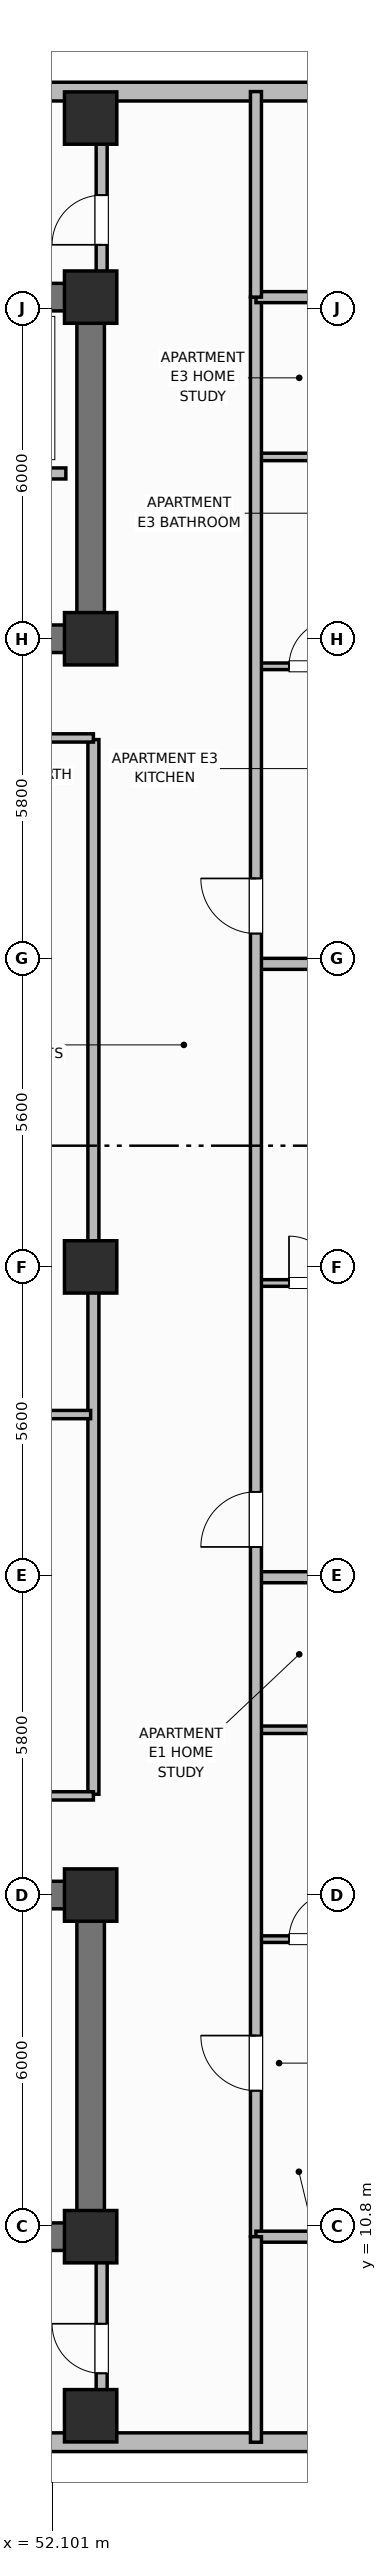
"""IFC4 building model, lengths in metres.
Left out: names, types, materials, properties, quantities, classifications, styles, units other than length and angle.
Written with IfcOpenShell. Run it as: python <this file> out.ifc"""

import sys

from ifc_helpers import new_model, si_unit, direction, frame, frame_2d, origin, origin_2d, place, context, subcontext, project, spatial, rectangle, extrude, element, fill, save


model = new_model("IFC4")
c1 = context("Model", 3, precision=1e-05, world=origin(), true_north=direction((0.0, 1.0)))
c2 = subcontext(c1, "Body", "Model", "MODEL_VIEW")
j1 = project(units=[si_unit("LENGTHUNIT", "METRE"), si_unit("PLANEANGLEUNIT", "RADIAN")], contexts=[c1])
p1 = place(None, origin())
s1 = spatial("IfcSite", under=j1, at=p1, CompositionType="ELEMENT")
p2 = place(p1, origin())
s2 = spatial("IfcBuilding", under=s1, at=p2, CompositionType="ELEMENT")
p3 = place(p2, frame((0.0, 0.0, 151.5)))
s3 = spatial("IfcBuildingStorey", under=s2, at=p3, CompositionType="ELEMENT", Elevation=151.5)
p4 = place(p3, frame((52.8, 10.6, 0.0), z_axis=(0.0, 0.0, 1.0), x_axis=(-1.0, 0.0, 0.0)))
e1 = element("IfcWall", 1, at=p4, inside=s3, PredefinedType="SHEAR", context=c2, shape_type="SweptSolid", body=[
    extrude(rectangle(XDim=27.2, YDim=0.5, at=frame_2d((13.6, 0.0))), origin(), (0.0, 0.0, 1.0), 3.7),
])
p5 = place(p3, frame((52.8, 10.85, 0.0), z_axis=(0.0, 0.0, 1.0), x_axis=(0.0, 1.0, 0.0)))
e2 = element("IfcWall", 2, at=p5, inside=s3, PredefinedType="SHEAR", context=c2, shape_type="SweptSolid", body=[
    extrude(rectangle(XDim=5.7, YDim=0.5, at=frame_2d((2.85, 0.0))), origin(), (0.0, 0.0, 1.0), 3.7),
])
p6 = place(p3, frame((25.6, 16.8, 0.0), z_axis=(0.0, 0.0, 1.0), x_axis=(1.0, 0.0, 0.0)))
e3 = element("IfcWall", 3, at=p6, inside=s3, PredefinedType="SHEAR", context=c2, shape_type="SweptSolid", body=[
    extrude(rectangle(XDim=27.2, YDim=0.5, at=frame_2d((13.6, 0.0))), origin(), (0.0, 0.0, 1.0), 3.7),
])
p7 = place(p6, frame((1.9, 0.0, 0.0)))
e4 = element("IfcOpeningElement", 4, at=p7, cuts=e3, PredefinedType="OPENING", context=c2, shape_type="SweptSolid", body=[
    extrude(rectangle(XDim=1.1, YDim=2.15, at=frame_2d((0.55, 1.075))), frame((0.0, 0.26, 0.0), z_axis=(0.0, -1.0, 0.0), x_axis=(1.0, 0.0, 0.0)), (0.0, 0.0, 1.0), 0.52),
])
p8 = place(p6, frame((13.0, 0.0, 0.0)))
e5 = element("IfcOpeningElement", 5, at=p8, cuts=e3, PredefinedType="OPENING", context=c2, shape_type="SweptSolid", body=[
    extrude(rectangle(XDim=1.2, YDim=2.15, at=frame_2d((0.6, 1.075))), frame((0.0, 0.26, 0.0), z_axis=(0.0, -1.0, 0.0), x_axis=(1.0, 0.0, 0.0)), (0.0, 0.0, 1.0), 0.52),
])
p9 = place(p6, frame((21.6, 0.0, 0.0)))
e6 = element("IfcOpeningElement", 6, at=p9, cuts=e3, PredefinedType="OPENING", context=c2, shape_type="SweptSolid", body=[
    extrude(rectangle(XDim=1.0, YDim=2.15, at=frame_2d((0.5, 1.075))), frame((0.0, 0.26, 0.0), z_axis=(0.0, -1.0, 0.0), x_axis=(1.0, 0.0, 0.0)), (0.0, 0.0, 1.0), 0.52),
])
p10 = place(p3, frame((25.6, 45.8, 0.0), z_axis=(0.0, 0.0, 1.0), x_axis=(1.0, 0.0, 0.0)))
e7 = element("IfcWall", 7, at=p10, inside=s3, PredefinedType="SHEAR", context=c2, shape_type="SweptSolid", body=[
    extrude(rectangle(XDim=27.2, YDim=0.5, at=frame_2d((13.6, 0.0))), origin(), (0.0, 0.0, 1.0), 3.7),
])
p11 = place(p3, frame((52.8, 39.85, 0.0), z_axis=(0.0, 0.0, 1.0), x_axis=(0.0, 1.0, 0.0)))
e8 = element("IfcWall", 8, at=p11, inside=s3, PredefinedType="SHEAR", context=c2, shape_type="SweptSolid", body=[
    extrude(rectangle(XDim=5.7, YDim=0.5, at=frame_2d((2.85, 0.0))), origin(), (0.0, 0.0, 1.0), 3.7),
])
p12 = place(p3, frame((52.8, 39.6, 0.0), z_axis=(0.0, 0.0, 1.0), x_axis=(-1.0, 0.0, 0.0)))
e9 = element("IfcWall", 9, at=p12, inside=s3, PredefinedType="SHEAR", context=c2, shape_type="SweptSolid", body=[
    extrude(rectangle(XDim=27.2, YDim=0.5, at=frame_2d((13.6, 0.0))), origin(), (0.0, 0.0, 1.0), 3.7),
])
p13 = place(p12, frame((24.2, 0.0, 0.0)))
e10 = element("IfcOpeningElement", 10, at=p13, cuts=e9, PredefinedType="OPENING", context=c2, shape_type="SweptSolid", body=[
    extrude(rectangle(XDim=1.1, YDim=2.15, at=frame_2d((0.55, 1.075))), frame((0.0, 0.26, 0.0), z_axis=(0.0, -1.0, 0.0), x_axis=(1.0, 0.0, 0.0)), (0.0, 0.0, 1.0), 0.52),
])
p14 = place(p12, frame((15.1, 0.0, 0.0)))
e11 = element("IfcOpeningElement", 11, at=p14, cuts=e9, PredefinedType="OPENING", context=c2, shape_type="SweptSolid", body=[
    extrude(rectangle(XDim=1.2, YDim=2.15, at=frame_2d((0.6, 1.075))), frame((0.0, 0.26, 0.0), z_axis=(0.0, -1.0, 0.0), x_axis=(1.0, 0.0, 0.0)), (0.0, 0.0, 1.0), 0.52),
])
p15 = place(p12, frame((11.6, 0.0, 0.0)))
e12 = element("IfcOpeningElement", 12, at=p15, cuts=e9, PredefinedType="OPENING", context=c2, shape_type="SweptSolid", body=[
    extrude(rectangle(XDim=0.9, YDim=2.1, at=frame_2d((0.45, 1.05))), frame((0.0, 0.26, 0.0), z_axis=(0.0, -1.0, 0.0), x_axis=(1.0, 0.0, 0.0)), (0.0, 0.0, 1.0), 0.52),
])
p16 = place(p12, frame((7.35, 0.0, 0.0)))
e13 = element("IfcOpeningElement", 13, at=p16, cuts=e9, PredefinedType="OPENING", context=c2, shape_type="SweptSolid", body=[
    extrude(rectangle(XDim=0.85, YDim=2.1, at=frame_2d((0.425, 1.05))), frame((0.0, 0.26, 0.0), z_axis=(0.0, -1.0, 0.0), x_axis=(1.0, 0.0, 0.0)), (0.0, 0.0, 1.0), 0.52),
])
p17 = place(p12, frame((3.6, 0.0, 0.0)))
e14 = element("IfcOpeningElement", 14, at=p17, cuts=e9, PredefinedType="OPENING", context=c2, shape_type="SweptSolid", body=[
    extrude(rectangle(XDim=1.0, YDim=2.15, at=frame_2d((0.5, 1.075))), frame((0.0, 0.26, 0.0), z_axis=(0.0, -1.0, 0.0), x_axis=(1.0, 0.0, 0.0)), (0.0, 0.0, 1.0), 0.52),
])
for number, where, z_axis, x_axis in (
    (15, (52.8, 10.6, 0.0), (0.0, 0.0, 1.0), (1.0, 0.0, 0.0)),
    (16, (52.8, 16.8, 0.0), (0.0, 0.0, 1.0), (1.0, 0.0, 0.0)),
    (17, (52.8, 39.6, 0.0), (0.0, 0.0, 1.0), (1.0, 0.0, 0.0)),
    (18, (52.8, 45.8, 0.0), (0.0, 0.0, 1.0), (1.0, 0.0, 0.0)),
    (19, (52.8, 28.2, 0.0), (0.0, 0.0, 1.0), (1.0, 0.0, 0.0)),
    (20, (52.8, 7.35, 0.0), (0.0, 0.0, 1.0), (1.0, 0.0, 0.0)),
    (21, (52.8, 49.05, 0.0), (0.0, 0.0, 1.0), (1.0, 0.0, 0.0)),
):
    element("IfcColumn", number, at=place(p3, frame(where, z_axis=z_axis, x_axis=x_axis)), inside=s3, PredefinedType="COLUMN", context=c2, shape_type="SweptSolid", body=[
        extrude(rectangle(XDim=0.95, YDim=0.95, at=origin_2d()), origin(), (0.0, 0.0, 1.0), 3.7),
    ])
p18 = place(p3, frame((42.4, 6.87, 0.0), z_axis=(0.0, 0.0, 1.0), x_axis=(1.0, 0.0, 0.0)))
e22 = element("IfcWall", 22, at=p18, inside=s3, PredefinedType="SOLIDWALL", context=c2, shape_type="SweptSolid", body=[
    extrude(rectangle(XDim=15.8, YDim=0.34, at=frame_2d((7.9, 0.0))), origin(), (0.0, 0.0, 1.0), 2.72),
])
p19 = place(p18, frame((5.387, 0.0, 0.75)))
e23 = element("IfcOpeningElement", 23, at=p19, cuts=e22, PredefinedType="OPENING", context=c2, shape_type="SweptSolid", body=[
    extrude(rectangle(XDim=1.4, YDim=1.85, at=frame_2d((0.7, 0.925))), frame((0.0, 0.18, 0.0), z_axis=(0.0, -1.0, 0.0), x_axis=(1.0, 0.0, 0.0)), (0.0, 0.0, 1.0), 0.36),
])
p20 = place(p3, frame((58.2, 49.53, 0.0), z_axis=(0.0, 0.0, 1.0), x_axis=(-1.0, 0.0, 0.0)))
e24 = element("IfcWall", 24, at=p20, inside=s3, PredefinedType="SOLIDWALL", context=c2, shape_type="SweptSolid", body=[
    extrude(rectangle(XDim=15.8, YDim=0.34, at=frame_2d((7.9, 0.0))), origin(), (0.0, 0.0, 1.0), 2.72),
])
p21 = place(p20, frame((8.812, 0.0, 0.75)))
e25 = element("IfcOpeningElement", 25, at=p21, cuts=e24, PredefinedType="OPENING", context=c2, shape_type="SweptSolid", body=[
    extrude(rectangle(XDim=1.8, YDim=1.85, at=frame_2d((0.9, 0.925))), frame((0.0, 0.18, 0.0), z_axis=(0.0, -1.0, 0.0), x_axis=(1.0, 0.0, 0.0)), (0.0, 0.0, 1.0), 0.36),
])
p22 = place(p3, frame((52.35, 42.6, 0.0), z_axis=(0.0, 0.0, 1.0), x_axis=(-1.0, 0.0, 0.0)))
e26 = element("IfcWall", 26, at=p22, inside=s3, PredefinedType="PARTITIONING", context=c2, shape_type="SweptSolid", body=[
    extrude(rectangle(XDim=6.5, YDim=0.2, at=frame_2d((3.25, 0.0))), origin(), (0.0, 0.0, 1.0), 2.55),
])
p23 = place(p3, frame((52.85, 18.63, 0.0), z_axis=(0.0, 0.0, 1.0), x_axis=(0.0, 1.0, 0.0)))
e27 = element("IfcWall", 27, at=p23, inside=s3, PredefinedType="PARTITIONING", context=c2, shape_type="SweptSolid", body=[
    extrude(rectangle(XDim=19.14, YDim=0.2, at=frame_2d((9.57, 0.0))), origin(), (0.0, 0.0, 1.0), 2.55),
])
for number, where, z_axis, x_axis in (
    (28, (30.55, 18.6, 0.0), (0.0, 0.0, 1.0), (1.0, 0.0, 0.0)),
    (29, (30.55, 37.8, 0.0), (0.0, 0.0, 1.0), (1.0, 0.0, 0.0)),
):
    element("IfcWall", number, at=place(p3, frame(where, z_axis=z_axis, x_axis=x_axis)), inside=s3, PredefinedType="PARTITIONING", context=c2, shape_type="SweptSolid", body=[
        extrude(rectangle(XDim=22.3, YDim=0.15, at=frame_2d((11.15, 0.0))), origin(), (0.0, 0.0, 1.0), 2.55),
    ])
p24 = place(p3, frame((30.58, 25.521, 0.0), z_axis=(0.0, 0.0, 1.0), x_axis=(1.0, 0.0, 0.0)))
e30 = element("IfcWall", 30, at=p24, inside=s3, PredefinedType="PARTITIONING", context=c2, shape_type="SweptSolid", body=[
    extrude(rectangle(XDim=22.22, YDim=0.15, at=frame_2d((11.11, 0.0))), origin(), (0.0, 0.0, 1.0), 2.55),
])
p25 = place(p3, frame((55.8, 16.0, 0.0), z_axis=(0.0, 0.0, 1.0), x_axis=(1.0, 0.0, 0.0)))
e31 = element("IfcWall", 31, at=p25, inside=s3, PredefinedType="PARTITIONING", context=c2, shape_type="SweptSolid", body=[
    extrude(rectangle(XDim=2.25, YDim=0.12, at=frame_2d((1.125, 0.0))), origin(), (0.0, 0.0, 1.0), 2.55),
])
p26 = place(p25, frame((0.6, 0.0, 0.0)))
e32 = element("IfcOpeningElement", 32, at=p26, cuts=e31, PredefinedType="OPENING", context=c2, shape_type="SweptSolid", body=[
    extrude(rectangle(XDim=0.85, YDim=2.1, at=frame_2d((0.425, 1.05))), frame((0.0, 0.07, 0.0), z_axis=(0.0, -1.0, 0.0), x_axis=(1.0, 0.0, 0.0)), (0.0, 0.0, 1.0), 0.14),
])
p27 = place(p3, frame((55.8, 19.8, 0.0), z_axis=(0.0, 0.0, 1.0), x_axis=(1.0, 0.0, 0.0)))
e33 = element("IfcWall", 33, at=p27, inside=s3, PredefinedType="PARTITIONING", context=c2, shape_type="SweptSolid", body=[
    extrude(rectangle(XDim=2.25, YDim=0.135, at=frame_2d((1.125, 0.0))), origin(), (0.0, 0.0, 1.0), 2.55),
])
p28 = place(p3, frame((55.8, 22.568, 0.0), z_axis=(0.0, 0.0, 1.0), x_axis=(1.0, 0.0, 0.0)))
e34 = element("IfcWall", 34, at=p28, inside=s3, PredefinedType="PARTITIONING", context=c2, shape_type="SweptSolid", body=[
    extrude(rectangle(XDim=6.03, YDim=0.2, at=frame_2d((3.015, 0.0))), origin(), (0.0, 0.0, 1.0), 2.55),
])
p29 = place(p3, frame((55.8, 27.908, 0.0), z_axis=(0.0, 0.0, 1.0), x_axis=(1.0, 0.0, 0.0)))
e35 = element("IfcWall", 35, at=p29, inside=s3, PredefinedType="PARTITIONING", context=c2, shape_type="SweptSolid", body=[
    extrude(rectangle(XDim=2.25, YDim=0.12, at=frame_2d((1.125, 0.0))), origin(), (0.0, 0.0, 1.0), 2.55),
])
p30 = place(p29, frame((0.6, 0.0, 0.0)))
e36 = element("IfcOpeningElement", 36, at=p30, cuts=e35, PredefinedType="OPENING", context=c2, shape_type="SweptSolid", body=[
    extrude(rectangle(XDim=0.85, YDim=2.1, at=frame_2d((0.425, 1.05))), frame((0.0, 0.07, 0.0), z_axis=(0.0, -1.0, 0.0), x_axis=(1.0, 0.0, 0.0)), (0.0, 0.0, 1.0), 0.14),
])
p31 = place(p3, frame((55.8, 33.7, 0.0), z_axis=(0.0, 0.0, 1.0), x_axis=(1.0, 0.0, 0.0)))
e37 = element("IfcWall", 37, at=p31, inside=s3, PredefinedType="PARTITIONING", context=c2, shape_type="SweptSolid", body=[
    extrude(rectangle(XDim=6.03, YDim=0.2, at=frame_2d((3.015, 0.0))), origin(), (0.0, 0.0, 1.0), 2.55),
])
p32 = place(p3, frame((55.8, 39.1, 0.0), z_axis=(0.0, 0.0, 1.0), x_axis=(1.0, 0.0, 0.0)))
e38 = element("IfcWall", 38, at=p32, inside=s3, PredefinedType="PARTITIONING", context=c2, shape_type="SweptSolid", body=[
    extrude(rectangle(XDim=2.25, YDim=0.12, at=frame_2d((1.125, 0.0))), origin(), (0.0, 0.0, 1.0), 2.55),
])
p33 = place(p32, frame((0.6, 0.0, 0.0)))
e39 = element("IfcOpeningElement", 39, at=p33, cuts=e38, PredefinedType="OPENING", context=c2, shape_type="SweptSolid", body=[
    extrude(rectangle(XDim=0.85, YDim=2.1, at=frame_2d((0.425, 1.05))), frame((0.0, 0.07, 0.0), z_axis=(0.0, -1.0, 0.0), x_axis=(1.0, 0.0, 0.0)), (0.0, 0.0, 1.0), 0.14),
])
p34 = place(p3, frame((55.8, 42.9, 0.0), z_axis=(0.0, 0.0, 1.0), x_axis=(1.0, 0.0, 0.0)))
e40 = element("IfcWall", 40, at=p34, inside=s3, PredefinedType="PARTITIONING", context=c2, shape_type="SweptSolid", body=[
    extrude(rectangle(XDim=2.25, YDim=0.135, at=frame_2d((1.125, 0.0))), origin(), (0.0, 0.0, 1.0), 2.55),
])
p35 = place(p3, frame((55.8, 10.6, 0.0), z_axis=(0.0, 0.0, 1.0), x_axis=(0.0, 1.0, 0.0)))
e41 = element("IfcWall", 41, at=p35, inside=s3, PredefinedType="PARTITIONING", context=c2, shape_type="SweptSolid", body=[
    extrude(rectangle(XDim=35.2, YDim=0.2, at=frame_2d((17.6, 0.0))), origin(), (0.0, 0.0, 1.0), 2.55),
])
p36 = place(p35, frame((2.65, 0.0, 0.0)))
e42 = element("IfcOpeningElement", 42, at=p36, cuts=e41, PredefinedType="OPENING", context=c2, shape_type="SweptSolid", body=[
    extrude(rectangle(XDim=1.0, YDim=2.15, at=frame_2d((0.5, 1.075))), frame((0.0, 0.11, 0.0), z_axis=(0.0, -1.0, 0.0), x_axis=(1.0, 0.0, 0.0)), (0.0, 0.0, 1.0), 0.22),
])
p37 = place(p35, frame((12.518, 0.0, 0.0)))
e43 = element("IfcOpeningElement", 43, at=p37, cuts=e41, PredefinedType="OPENING", context=c2, shape_type="SweptSolid", body=[
    extrude(rectangle(XDim=1.0, YDim=2.15, at=frame_2d((0.5, 1.075))), frame((0.0, 0.11, 0.0), z_axis=(0.0, -1.0, 0.0), x_axis=(1.0, 0.0, 0.0)), (0.0, 0.0, 1.0), 0.22),
])
p38 = place(p35, frame((23.65, 0.0, 0.0)))
e44 = element("IfcOpeningElement", 44, at=p38, cuts=e41, PredefinedType="OPENING", context=c2, shape_type="SweptSolid", body=[
    extrude(rectangle(XDim=1.0, YDim=2.15, at=frame_2d((0.5, 1.075))), frame((0.0, 0.11, 0.0), z_axis=(0.0, -1.0, 0.0), x_axis=(1.0, 0.0, 0.0)), (0.0, 0.0, 1.0), 0.22),
])
for number, where, z_axis, x_axis in (
    (45, (55.8, 10.6, 0.0), (0.0, 0.0, 1.0), (1.0, 0.0, 0.0)),
    (46, (55.8, 45.8, 0.0), (0.0, 0.0, 1.0), (1.0, 0.0, 0.0)),
):
    element("IfcWall", number, at=place(p3, frame(where, z_axis=z_axis, x_axis=x_axis)), inside=s3, PredefinedType="PARTITIONING", context=c2, shape_type="SweptSolid", body=[
        extrude(rectangle(XDim=5.61, YDim=0.2, at=frame_2d((2.805, 0.0))), origin(), (0.0, 0.0, 1.0), 2.55),
    ])
for number, where, z_axis, x_axis in (
    (47, (55.8, 6.87, 0.0), (0.0, 0.0, 1.0), (0.0, 1.0, 0.0)),
    (48, (55.8, 45.8, 0.0), (0.0, 0.0, 1.0), (0.0, 1.0, 0.0)),
):
    element("IfcWall", number, at=place(p3, frame(where, z_axis=z_axis, x_axis=x_axis)), inside=s3, PredefinedType="PARTITIONING", context=c2, shape_type="SweptSolid", body=[
        extrude(rectangle(XDim=3.73, YDim=0.2, at=frame_2d((1.865, 0.0))), origin(), (0.0, 0.0, 1.0), 2.55),
    ])
p39 = place(p3, frame((53.0, 7.47, 0.0), z_axis=(0.0, 0.0, 1.0), x_axis=(0.0, 1.0, 0.0)))
e49 = element("IfcWall", 49, at=p39, inside=s3, PredefinedType="PARTITIONING", context=c2, shape_type="SweptSolid", body=[
    extrude(rectangle(XDim=2.83, YDim=0.2, at=frame_2d((1.415, 0.0))), origin(), (0.0, 0.0, 1.0), 2.55),
])
p40 = place(p39, frame((0.65, 0.0, 0.0)))
e50 = element("IfcOpeningElement", 50, at=p40, cuts=e49, PredefinedType="OPENING", context=c2, shape_type="SweptSolid", body=[
    extrude(rectangle(XDim=0.9, YDim=2.1, at=frame_2d((0.45, 1.05))), frame((0.0, 0.11, 0.0), z_axis=(0.0, -1.0, 0.0), x_axis=(1.0, 0.0, 0.0)), (0.0, 0.0, 1.0), 0.22),
])
p41 = place(p3, frame((53.0, 46.1, 0.0), z_axis=(0.0, 0.0, 1.0), x_axis=(0.0, 1.0, 0.0)))
e51 = element("IfcWall", 51, at=p41, inside=s3, PredefinedType="PARTITIONING", context=c2, shape_type="SweptSolid", body=[
    extrude(rectangle(XDim=2.83, YDim=0.2, at=frame_2d((1.415, 0.0))), origin(), (0.0, 0.0, 1.0), 2.55),
])
p42 = place(p41, frame((0.65, 0.0, 0.0)))
e52 = element("IfcOpeningElement", 52, at=p42, cuts=e51, PredefinedType="OPENING", context=c2, shape_type="SweptSolid", body=[
    extrude(rectangle(XDim=0.9, YDim=2.1, at=frame_2d((0.45, 1.05))), frame((0.0, 0.11, 0.0), z_axis=(0.0, -1.0, 0.0), x_axis=(1.0, 0.0, 0.0)), (0.0, 0.0, 1.0), 0.22),
])
p43 = place(p26, origin())
e53 = element("IfcDoor", 53, at=p43, inside=s3, OperationType="SINGLE_SWING_RIGHT", PredefinedType="DOOR", context=c2, shape_type="SweptSolid", body=[
    extrude(rectangle(XDim=0.85, YDim=2.1, at=frame_2d((0.425, 1.05))), frame((0.0, 0.025, 0.0), z_axis=(0.0, -1.0, 0.0), x_axis=(1.0, 0.0, 0.0)), (0.0, 0.0, 1.0), 0.05),
])
fill(e32, e53)
p44 = place(p30, origin())
e54 = element("IfcDoor", 54, at=p44, inside=s3, OperationType="SINGLE_SWING_LEFT", PredefinedType="DOOR", context=c2, shape_type="SweptSolid", body=[
    extrude(rectangle(XDim=0.85, YDim=2.1, at=frame_2d((0.425, 1.05))), frame((0.0, 0.025, 0.0), z_axis=(0.0, -1.0, 0.0), x_axis=(1.0, 0.0, 0.0)), (0.0, 0.0, 1.0), 0.05),
])
fill(e36, e54)
p45 = place(p33, origin())
e55 = element("IfcDoor", 55, at=p45, inside=s3, OperationType="SINGLE_SWING_RIGHT", PredefinedType="DOOR", context=c2, shape_type="SweptSolid", body=[
    extrude(rectangle(XDim=0.85, YDim=2.1, at=frame_2d((0.425, 1.05))), frame((0.0, 0.025, 0.0), z_axis=(0.0, -1.0, 0.0), x_axis=(1.0, 0.0, 0.0)), (0.0, 0.0, 1.0), 0.05),
])
fill(e39, e55)
p46 = place(p36, origin())
e56 = element("IfcDoor", 56, at=p46, inside=s3, OperationType="SINGLE_SWING_RIGHT", PredefinedType="DOOR", context=c2, shape_type="SweptSolid", body=[
    extrude(rectangle(XDim=1.0, YDim=2.15, at=frame_2d((0.5, 1.075))), frame((0.0, 0.025, 0.0), z_axis=(0.0, -1.0, 0.0), x_axis=(1.0, 0.0, 0.0)), (0.0, 0.0, 1.0), 0.05),
])
fill(e42, e56)
p47 = place(p37, origin())
e57 = element("IfcDoor", 57, at=p47, inside=s3, OperationType="SINGLE_SWING_LEFT", PredefinedType="DOOR", context=c2, shape_type="SweptSolid", body=[
    extrude(rectangle(XDim=1.0, YDim=2.15, at=frame_2d((0.5, 1.075))), frame((0.0, 0.025, 0.0), z_axis=(0.0, -1.0, 0.0), x_axis=(1.0, 0.0, 0.0)), (0.0, 0.0, 1.0), 0.05),
])
fill(e43, e57)
p48 = place(p38, origin())
e58 = element("IfcDoor", 58, at=p48, inside=s3, OperationType="SINGLE_SWING_RIGHT", PredefinedType="DOOR", context=c2, shape_type="SweptSolid", body=[
    extrude(rectangle(XDim=1.0, YDim=2.15, at=frame_2d((0.5, 1.075))), frame((0.0, 0.025, 0.0), z_axis=(0.0, -1.0, 0.0), x_axis=(1.0, 0.0, 0.0)), (0.0, 0.0, 1.0), 0.05),
])
fill(e44, e58)
p49 = place(p40, origin())
e59 = element("IfcDoor", 59, at=p49, inside=s3, OperationType="SINGLE_SWING_RIGHT", PredefinedType="DOOR", context=c2, shape_type="SweptSolid", body=[
    extrude(rectangle(XDim=0.9, YDim=2.1, at=frame_2d((0.45, 1.05))), frame((0.0, 0.025, 0.0), z_axis=(0.0, -1.0, 0.0), x_axis=(1.0, 0.0, 0.0)), (0.0, 0.0, 1.0), 0.05),
])
fill(e50, e59)
p50 = place(p42, origin())
e60 = element("IfcDoor", 60, at=p50, inside=s3, OperationType="SINGLE_SWING_LEFT", PredefinedType="DOOR", context=c2, shape_type="SweptSolid", body=[
    extrude(rectangle(XDim=0.9, YDim=2.1, at=frame_2d((0.45, 1.05))), frame((0.0, 0.025, 0.0), z_axis=(0.0, -1.0, 0.0), x_axis=(1.0, 0.0, 0.0)), (0.0, 0.0, 1.0), 0.05),
])
fill(e52, e60)
save(model, sys.argv[1])
